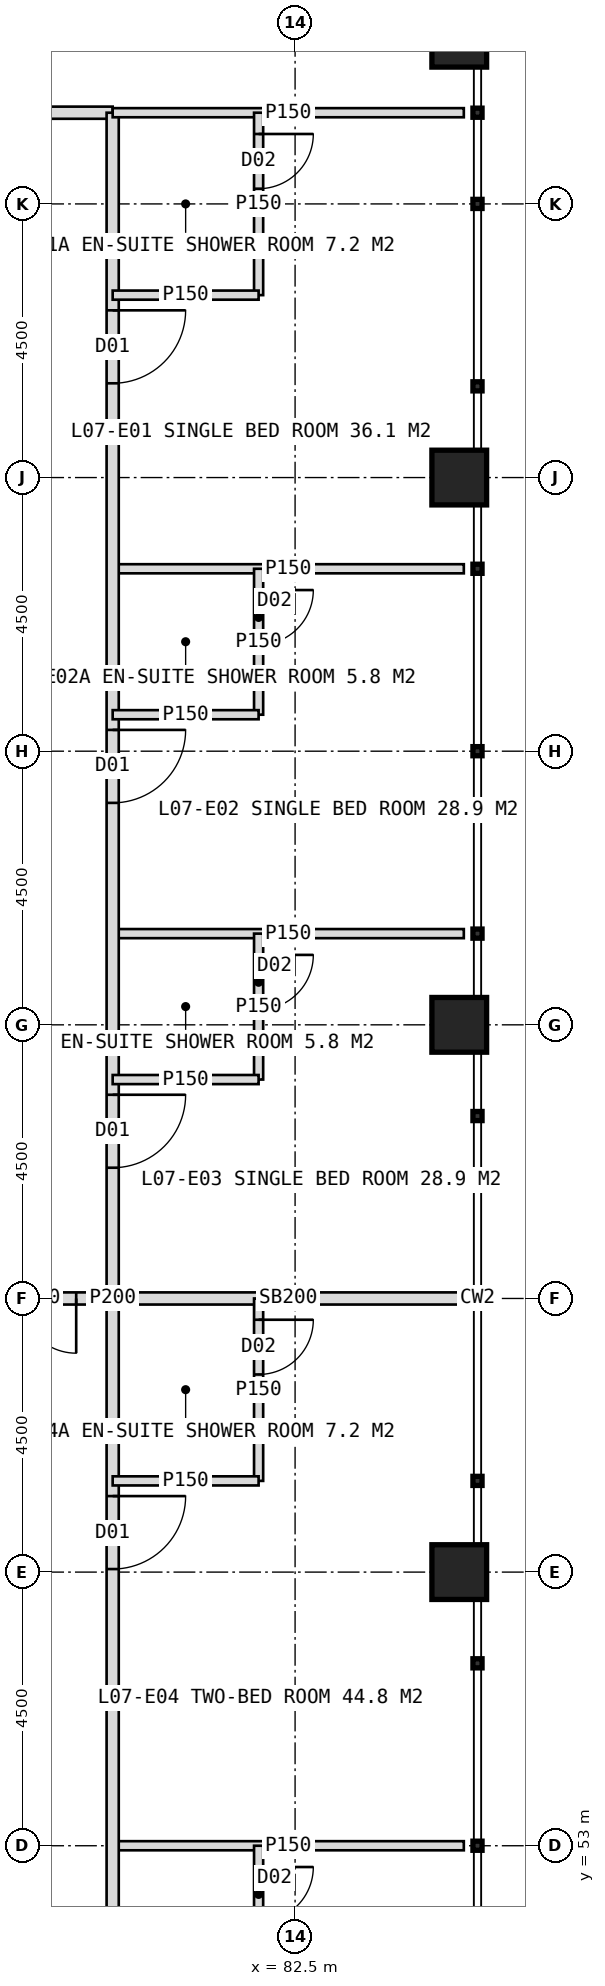
"""IFC4 building model, lengths in metres.
Left out: names, types, materials, properties, quantities, classifications, styles, units other than length and angle.
Written with IfcOpenShell. Run it as: python <this file> out.ifc"""

import sys

from ifc_helpers import new_model, si_unit, direction, frame, frame_2d, origin, origin_2d, place, context, subcontext, project, spatial, rectangle, hollow_rectangle, extrude, element, fill, save


model = new_model("IFC4")
c1 = context("Model", 3, precision=1e-05, world=origin(), true_north=direction((0.0, 1.0)))
c2 = subcontext(c1, "Body", "Model", "MODEL_VIEW")
j1 = project(units=[si_unit("LENGTHUNIT", "METRE"), si_unit("PLANEANGLEUNIT", "RADIAN")], contexts=[c1])
p1 = place(None, origin())
s1 = spatial("IfcSite", under=j1, at=p1, CompositionType="ELEMENT")
p2 = place(p1, origin())
s2 = spatial("IfcBuilding", under=s1, at=p2, CompositionType="ELEMENT")
p3 = place(p2, frame((0.0, 0.0, 35.0)))
s3 = spatial("IfcBuildingStorey", under=s2, at=p3, CompositionType="ELEMENT", Elevation=35.0)
for number, where, z_axis, x_axis in (
    (1, (85.2, 57.5, 0.0), (0.0, 0.0, 1.0), (1.0, 0.0, 0.0)),
    (2, (85.2, 66.5, 0.0), (0.0, 0.0, 1.0), (1.0, 0.0, 0.0)),
    (3, (85.2, 75.5, 0.0), (0.0, 0.0, 1.0), (1.0, 0.0, 0.0)),
    (4, (85.2, 82.7, 0.0), (0.0, 0.0, 1.0), (1.0, 0.0, 0.0)),
):
    element("IfcColumn", number, at=place(p3, frame(where, z_axis=z_axis, x_axis=x_axis)), inside=s3, PredefinedType="COLUMN", context=c2, shape_type="SweptSolid", body=[
        extrude(hollow_rectangle(XDim=0.9, YDim=0.9, WallThickness=0.08, at=origin_2d()), origin(), (0.0, 0.0, 1.0), 4.0),
    ])
p4 = place(p3, frame((40.5, 81.5, 0.0), z_axis=(0.0, 0.0, 1.0), x_axis=(1.0, 0.0, 0.0)))
e5 = element("IfcWall", 5, at=p4, inside=s3, PredefinedType="PARTITIONING", context=c2, shape_type="SweptSolid", body=[
    extrude(rectangle(XDim=39.0, YDim=0.2, at=frame_2d((19.5, 0.0))), origin(), (0.0, 0.0, 1.0), 3.75),
])
p5 = place(p4, frame((3.25, 0.0, 0.0)))
e6 = element("IfcOpeningElement", 6, at=p5, cuts=e5, PredefinedType="OPENING", context=c2, shape_type="SweptSolid", body=[
    extrude(rectangle(XDim=1.2, YDim=2.2, at=frame_2d((0.6, 1.1))), frame((0.0, 0.11, 0.0), z_axis=(0.0, -1.0, 0.0), x_axis=(1.0, 0.0, 0.0)), (0.0, 0.0, 1.0), 0.22),
])
p6 = place(p4, frame((13.75, 0.0, 0.0)))
e7 = element("IfcOpeningElement", 7, at=p6, cuts=e5, PredefinedType="OPENING", context=c2, shape_type="SweptSolid", body=[
    extrude(rectangle(XDim=1.2, YDim=2.2, at=frame_2d((0.6, 1.1))), frame((0.0, 0.11, 0.0), z_axis=(0.0, -1.0, 0.0), x_axis=(1.0, 0.0, 0.0)), (0.0, 0.0, 1.0), 0.22),
])
p7 = place(p4, frame((22.75, 0.0, 0.0)))
e8 = element("IfcOpeningElement", 8, at=p7, cuts=e5, PredefinedType="OPENING", context=c2, shape_type="SweptSolid", body=[
    extrude(rectangle(XDim=1.2, YDim=2.2, at=frame_2d((0.6, 1.1))), frame((0.0, 0.11, 0.0), z_axis=(0.0, -1.0, 0.0), x_axis=(1.0, 0.0, 0.0)), (0.0, 0.0, 1.0), 0.22),
])
p8 = place(p4, frame((33.25, 0.0, 0.0)))
e9 = element("IfcOpeningElement", 9, at=p8, cuts=e5, PredefinedType="OPENING", context=c2, shape_type="SweptSolid", body=[
    extrude(rectangle(XDim=1.0, YDim=2.1, at=frame_2d((0.5, 1.05))), frame((0.0, 0.11, 0.0), z_axis=(0.0, -1.0, 0.0), x_axis=(1.0, 0.0, 0.0)), (0.0, 0.0, 1.0), 0.22),
])
for number, where, z_axis, x_axis in (
    (10, (79.5, 74.0, 0.0), (0.0, 0.0, 1.0), (1.0, 0.0, 0.0)),
    (11, (79.5, 68.0, 0.0), (0.0, 0.0, 1.0), (1.0, 0.0, 0.0)),
):
    element("IfcWall", number, at=place(p3, frame(where, z_axis=z_axis, x_axis=x_axis)), inside=s3, PredefinedType="PARTITIONING", context=c2, shape_type="SweptSolid", body=[
        extrude(rectangle(XDim=5.775, YDim=0.15, at=frame_2d((2.887, 0.0))), origin(), (0.0, 0.0, 1.0), 3.75),
    ])
p9 = place(p3, frame((79.5, 62.0, 0.0), z_axis=(0.0, 0.0, 1.0), x_axis=(1.0, 0.0, 0.0)))
e12 = element("IfcWall", 12, at=p9, inside=s3, PredefinedType="SOLIDWALL", context=c2, shape_type="SweptSolid", body=[
    extrude(rectangle(XDim=5.775, YDim=0.2, at=frame_2d((2.887, 0.0))), origin(), (0.0, 0.0, 1.0), 2.75),
])
p10 = place(p3, frame((79.5, 53.0, 0.0), z_axis=(0.0, 0.0, 1.0), x_axis=(1.0, 0.0, 0.0)))
e13 = element("IfcWall", 13, at=p10, inside=s3, PredefinedType="PARTITIONING", context=c2, shape_type="SweptSolid", body=[
    extrude(rectangle(XDim=5.775, YDim=0.15, at=frame_2d((2.887, 0.0))), origin(), (0.0, 0.0, 1.0), 3.75),
])
p11 = place(p3, frame((79.5, 81.5, 0.0), z_axis=(0.0, 0.0, 1.0), x_axis=(0.0, -1.0, 0.0)))
e14 = element("IfcWall", 14, at=p11, inside=s3, PredefinedType="PARTITIONING", context=c2, shape_type="SweptSolid", body=[
    extrude(rectangle(XDim=39.0, YDim=0.2, at=frame_2d((19.5, 0.0))), origin(), (0.0, 0.0, 1.0), 3.75),
])
p12 = place(p11, frame((3.25, 0.0, 0.0)))
e15 = element("IfcOpeningElement", 15, at=p12, cuts=e14, PredefinedType="OPENING", context=c2, shape_type="SweptSolid", body=[
    extrude(rectangle(XDim=1.2, YDim=2.2, at=frame_2d((0.6, 1.1))), frame((0.0, 0.11, 0.0), z_axis=(0.0, -1.0, 0.0), x_axis=(1.0, 0.0, 0.0)), (0.0, 0.0, 1.0), 0.22),
])
p13 = place(p11, frame((10.15, 0.0, 0.0)))
e16 = element("IfcOpeningElement", 16, at=p13, cuts=e14, PredefinedType="OPENING", context=c2, shape_type="SweptSolid", body=[
    extrude(rectangle(XDim=1.2, YDim=2.2, at=frame_2d((0.6, 1.1))), frame((0.0, 0.11, 0.0), z_axis=(0.0, -1.0, 0.0), x_axis=(1.0, 0.0, 0.0)), (0.0, 0.0, 1.0), 0.22),
])
p14 = place(p11, frame((16.15, 0.0, 0.0)))
e17 = element("IfcOpeningElement", 17, at=p14, cuts=e14, PredefinedType="OPENING", context=c2, shape_type="SweptSolid", body=[
    extrude(rectangle(XDim=1.2, YDim=2.2, at=frame_2d((0.6, 1.1))), frame((0.0, 0.11, 0.0), z_axis=(0.0, -1.0, 0.0), x_axis=(1.0, 0.0, 0.0)), (0.0, 0.0, 1.0), 0.22),
])
p15 = place(p11, frame((22.75, 0.0, 0.0)))
e18 = element("IfcOpeningElement", 18, at=p15, cuts=e14, PredefinedType="OPENING", context=c2, shape_type="SweptSolid", body=[
    extrude(rectangle(XDim=1.2, YDim=2.2, at=frame_2d((0.6, 1.1))), frame((0.0, 0.11, 0.0), z_axis=(0.0, -1.0, 0.0), x_axis=(1.0, 0.0, 0.0)), (0.0, 0.0, 1.0), 0.22),
])
p16 = place(p11, frame((31.15, 0.0, 0.0)))
e19 = element("IfcOpeningElement", 19, at=p16, cuts=e14, PredefinedType="OPENING", context=c2, shape_type="SweptSolid", body=[
    extrude(rectangle(XDim=1.2, YDim=2.2, at=frame_2d((0.6, 1.1))), frame((0.0, 0.11, 0.0), z_axis=(0.0, -1.0, 0.0), x_axis=(1.0, 0.0, 0.0)), (0.0, 0.0, 1.0), 0.22),
])
p17 = place(p3, frame((79.5, 81.5, 0.0), z_axis=(0.0, 0.0, 1.0), x_axis=(1.0, 0.0, 0.0)))
e20 = element("IfcWall", 20, at=p17, inside=s3, PredefinedType="PARTITIONING", context=c2, shape_type="SweptSolid", body=[
    extrude(rectangle(XDim=5.775, YDim=0.15, at=frame_2d((2.887, 0.0))), origin(), (0.0, 0.0, 1.0), 3.75),
])
p18 = place(p3, frame((81.9, 81.5, 0.0), z_axis=(0.0, 0.0, 1.0), x_axis=(0.0, -1.0, 0.0)))
e21 = element("IfcWall", 21, at=p18, inside=s3, PredefinedType="PARTITIONING", context=c2, shape_type="SweptSolid", body=[
    extrude(rectangle(XDim=3.0, YDim=0.15, at=frame_2d((1.5, 0.0))), origin(), (0.0, 0.0, 1.0), 3.75),
])
p19 = place(p18, frame((0.35, 0.0, 0.0)))
e22 = element("IfcOpeningElement", 22, at=p19, cuts=e21, PredefinedType="OPENING", context=c2, shape_type="SweptSolid", body=[
    extrude(rectangle(XDim=0.9, YDim=2.1, at=frame_2d((0.45, 1.05))), frame((0.0, 0.085, 0.0), z_axis=(0.0, -1.0, 0.0), x_axis=(1.0, 0.0, 0.0)), (0.0, 0.0, 1.0), 0.17),
])
p20 = place(p3, frame((79.5, 78.5, 0.0), z_axis=(0.0, 0.0, 1.0), x_axis=(1.0, 0.0, 0.0)))
e23 = element("IfcWall", 23, at=p20, inside=s3, PredefinedType="PARTITIONING", context=c2, shape_type="SweptSolid", body=[
    extrude(rectangle(XDim=2.4, YDim=0.15, at=frame_2d((1.2, 0.0))), origin(), (0.0, 0.0, 1.0), 3.75),
])
p21 = place(p3, frame((81.9, 74.0, 0.0), z_axis=(0.0, 0.0, 1.0), x_axis=(0.0, -1.0, 0.0)))
e24 = element("IfcWall", 24, at=p21, inside=s3, PredefinedType="PARTITIONING", context=c2, shape_type="SweptSolid", body=[
    extrude(rectangle(XDim=2.4, YDim=0.15, at=frame_2d((1.2, 0.0))), origin(), (0.0, 0.0, 1.0), 3.75),
])
p22 = place(p21, frame((0.35, 0.0, 0.0)))
e25 = element("IfcOpeningElement", 25, at=p22, cuts=e24, PredefinedType="OPENING", context=c2, shape_type="SweptSolid", body=[
    extrude(rectangle(XDim=0.9, YDim=2.1, at=frame_2d((0.45, 1.05))), frame((0.0, 0.085, 0.0), z_axis=(0.0, -1.0, 0.0), x_axis=(1.0, 0.0, 0.0)), (0.0, 0.0, 1.0), 0.17),
])
p23 = place(p3, frame((79.5, 71.6, 0.0), z_axis=(0.0, 0.0, 1.0), x_axis=(1.0, 0.0, 0.0)))
e26 = element("IfcWall", 26, at=p23, inside=s3, PredefinedType="PARTITIONING", context=c2, shape_type="SweptSolid", body=[
    extrude(rectangle(XDim=2.4, YDim=0.15, at=frame_2d((1.2, 0.0))), origin(), (0.0, 0.0, 1.0), 3.75),
])
p24 = place(p3, frame((81.9, 68.0, 0.0), z_axis=(0.0, 0.0, 1.0), x_axis=(0.0, -1.0, 0.0)))
e27 = element("IfcWall", 27, at=p24, inside=s3, PredefinedType="PARTITIONING", context=c2, shape_type="SweptSolid", body=[
    extrude(rectangle(XDim=2.4, YDim=0.15, at=frame_2d((1.2, 0.0))), origin(), (0.0, 0.0, 1.0), 3.75),
])
p25 = place(p24, frame((0.35, 0.0, 0.0)))
e28 = element("IfcOpeningElement", 28, at=p25, cuts=e27, PredefinedType="OPENING", context=c2, shape_type="SweptSolid", body=[
    extrude(rectangle(XDim=0.9, YDim=2.1, at=frame_2d((0.45, 1.05))), frame((0.0, 0.085, 0.0), z_axis=(0.0, -1.0, 0.0), x_axis=(1.0, 0.0, 0.0)), (0.0, 0.0, 1.0), 0.17),
])
p26 = place(p3, frame((79.5, 65.6, 0.0), z_axis=(0.0, 0.0, 1.0), x_axis=(1.0, 0.0, 0.0)))
e29 = element("IfcWall", 29, at=p26, inside=s3, PredefinedType="PARTITIONING", context=c2, shape_type="SweptSolid", body=[
    extrude(rectangle(XDim=2.4, YDim=0.15, at=frame_2d((1.2, 0.0))), origin(), (0.0, 0.0, 1.0), 3.75),
])
p27 = place(p3, frame((81.9, 62.0, 0.0), z_axis=(0.0, 0.0, 1.0), x_axis=(0.0, -1.0, 0.0)))
e30 = element("IfcWall", 30, at=p27, inside=s3, PredefinedType="PARTITIONING", context=c2, shape_type="SweptSolid", body=[
    extrude(rectangle(XDim=3.0, YDim=0.15, at=frame_2d((1.5, 0.0))), origin(), (0.0, 0.0, 1.0), 3.75),
])
p28 = place(p27, frame((0.35, 0.0, 0.0)))
e31 = element("IfcOpeningElement", 31, at=p28, cuts=e30, PredefinedType="OPENING", context=c2, shape_type="SweptSolid", body=[
    extrude(rectangle(XDim=0.9, YDim=2.1, at=frame_2d((0.45, 1.05))), frame((0.0, 0.085, 0.0), z_axis=(0.0, -1.0, 0.0), x_axis=(1.0, 0.0, 0.0)), (0.0, 0.0, 1.0), 0.17),
])
p29 = place(p3, frame((79.5, 59.0, 0.0), z_axis=(0.0, 0.0, 1.0), x_axis=(1.0, 0.0, 0.0)))
e32 = element("IfcWall", 32, at=p29, inside=s3, PredefinedType="PARTITIONING", context=c2, shape_type="SweptSolid", body=[
    extrude(rectangle(XDim=2.4, YDim=0.15, at=frame_2d((1.2, 0.0))), origin(), (0.0, 0.0, 1.0), 3.75),
])
p30 = place(p3, frame((81.9, 53.0, 0.0), z_axis=(0.0, 0.0, 1.0), x_axis=(0.0, -1.0, 0.0)))
e33 = element("IfcWall", 33, at=p30, inside=s3, PredefinedType="PARTITIONING", context=c2, shape_type="SweptSolid", body=[
    extrude(rectangle(XDim=2.4, YDim=0.15, at=frame_2d((1.2, 0.0))), origin(), (0.0, 0.0, 1.0), 3.75),
])
p31 = place(p30, frame((0.35, 0.0, 0.0)))
e34 = element("IfcOpeningElement", 34, at=p31, cuts=e33, PredefinedType="OPENING", context=c2, shape_type="SweptSolid", body=[
    extrude(rectangle(XDim=0.9, YDim=2.1, at=frame_2d((0.45, 1.05))), frame((0.0, 0.085, 0.0), z_axis=(0.0, -1.0, 0.0), x_axis=(1.0, 0.0, 0.0)), (0.0, 0.0, 1.0), 0.17),
])
p32 = place(p3, frame((76.8, 62.0, 0.0), z_axis=(0.0, 0.0, 1.0), x_axis=(1.0, 0.0, 0.0)))
e35 = element("IfcWall", 35, at=p32, inside=s3, PredefinedType="SOLIDWALL", context=c2, shape_type="SweptSolid", body=[
    extrude(rectangle(XDim=2.7, YDim=0.2, at=frame_2d((1.35, 0.0))), origin(), (0.0, 0.0, 1.0), 2.75),
])
p33 = place(p32, frame((0.3, 0.0, 0.0)))
e36 = element("IfcOpeningElement", 36, at=p33, cuts=e35, PredefinedType="OPENING", context=c2, shape_type="SweptSolid", body=[
    extrude(rectangle(XDim=1.8, YDim=2.2, at=frame_2d((0.9, 1.1))), frame((0.0, 0.11, 0.0), z_axis=(0.0, -1.0, 0.0), x_axis=(1.0, 0.0, 0.0)), (0.0, 0.0, 1.0), 0.22),
])
p34 = place(p12, origin())
e37 = element("IfcDoor", 37, at=p34, inside=s3, OperationType="SINGLE_SWING_LEFT", PredefinedType="DOOR", context=c2, shape_type="SweptSolid", body=[
    extrude(rectangle(XDim=1.2, YDim=2.2, at=frame_2d((0.6, 1.1))), frame((0.0, 0.025, 0.0), z_axis=(0.0, -1.0, 0.0), x_axis=(1.0, 0.0, 0.0)), (0.0, 0.0, 1.0), 0.05),
])
fill(e15, e37)
p35 = place(p19, origin())
e38 = element("IfcDoor", 38, at=p35, inside=s3, OperationType="SINGLE_SWING_LEFT", PredefinedType="DOOR", context=c2, shape_type="SweptSolid", body=[
    extrude(rectangle(XDim=0.9, YDim=2.1, at=frame_2d((0.45, 1.05))), frame((0.0, 0.025, 0.0), z_axis=(0.0, -1.0, 0.0), x_axis=(1.0, 0.0, 0.0)), (0.0, 0.0, 1.0), 0.05),
])
fill(e22, e38)
p36 = place(p13, origin())
e39 = element("IfcDoor", 39, at=p36, inside=s3, OperationType="SINGLE_SWING_LEFT", PredefinedType="DOOR", context=c2, shape_type="SweptSolid", body=[
    extrude(rectangle(XDim=1.2, YDim=2.2, at=frame_2d((0.6, 1.1))), frame((0.0, 0.025, 0.0), z_axis=(0.0, -1.0, 0.0), x_axis=(1.0, 0.0, 0.0)), (0.0, 0.0, 1.0), 0.05),
])
fill(e16, e39)
p37 = place(p22, origin())
e40 = element("IfcDoor", 40, at=p37, inside=s3, OperationType="SINGLE_SWING_LEFT", PredefinedType="DOOR", context=c2, shape_type="SweptSolid", body=[
    extrude(rectangle(XDim=0.9, YDim=2.1, at=frame_2d((0.45, 1.05))), frame((0.0, 0.025, 0.0), z_axis=(0.0, -1.0, 0.0), x_axis=(1.0, 0.0, 0.0)), (0.0, 0.0, 1.0), 0.05),
])
fill(e25, e40)
p38 = place(p14, origin())
e41 = element("IfcDoor", 41, at=p38, inside=s3, OperationType="SINGLE_SWING_LEFT", PredefinedType="DOOR", context=c2, shape_type="SweptSolid", body=[
    extrude(rectangle(XDim=1.2, YDim=2.2, at=frame_2d((0.6, 1.1))), frame((0.0, 0.025, 0.0), z_axis=(0.0, -1.0, 0.0), x_axis=(1.0, 0.0, 0.0)), (0.0, 0.0, 1.0), 0.05),
])
fill(e17, e41)
p39 = place(p25, origin())
e42 = element("IfcDoor", 42, at=p39, inside=s3, OperationType="SINGLE_SWING_LEFT", PredefinedType="DOOR", context=c2, shape_type="SweptSolid", body=[
    extrude(rectangle(XDim=0.9, YDim=2.1, at=frame_2d((0.45, 1.05))), frame((0.0, 0.025, 0.0), z_axis=(0.0, -1.0, 0.0), x_axis=(1.0, 0.0, 0.0)), (0.0, 0.0, 1.0), 0.05),
])
fill(e28, e42)
p40 = place(p15, origin())
e43 = element("IfcDoor", 43, at=p40, inside=s3, OperationType="SINGLE_SWING_LEFT", PredefinedType="DOOR", context=c2, shape_type="SweptSolid", body=[
    extrude(rectangle(XDim=1.2, YDim=2.2, at=frame_2d((0.6, 1.1))), frame((0.0, 0.025, 0.0), z_axis=(0.0, -1.0, 0.0), x_axis=(1.0, 0.0, 0.0)), (0.0, 0.0, 1.0), 0.05),
])
fill(e18, e43)
p41 = place(p28, origin())
e44 = element("IfcDoor", 44, at=p41, inside=s3, OperationType="SINGLE_SWING_LEFT", PredefinedType="DOOR", context=c2, shape_type="SweptSolid", body=[
    extrude(rectangle(XDim=0.9, YDim=2.1, at=frame_2d((0.45, 1.05))), frame((0.0, 0.025, 0.0), z_axis=(0.0, -1.0, 0.0), x_axis=(1.0, 0.0, 0.0)), (0.0, 0.0, 1.0), 0.05),
])
fill(e31, e44)
p42 = place(p31, origin())
e45 = element("IfcDoor", 45, at=p42, inside=s3, OperationType="SINGLE_SWING_LEFT", PredefinedType="DOOR", context=c2, shape_type="SweptSolid", body=[
    extrude(rectangle(XDim=0.9, YDim=2.1, at=frame_2d((0.45, 1.05))), frame((0.0, 0.025, 0.0), z_axis=(0.0, -1.0, 0.0), x_axis=(1.0, 0.0, 0.0)), (0.0, 0.0, 1.0), 0.05),
])
fill(e34, e45)
p43 = place(p33, origin())
e46 = element("IfcDoor", 46, at=p43, inside=s3, OperationType="DOUBLE_DOOR_DOUBLE_SWING", PredefinedType="DOOR", context=c2, shape_type="SweptSolid", body=[
    extrude(rectangle(XDim=1.8, YDim=2.2, at=frame_2d((0.9, 1.1))), frame((0.0, 0.025, 0.0), z_axis=(0.0, -1.0, 0.0), x_axis=(1.0, 0.0, 0.0)), (0.0, 0.0, 1.0), 0.05),
])
fill(e36, e46)
save(model, sys.argv[1])
